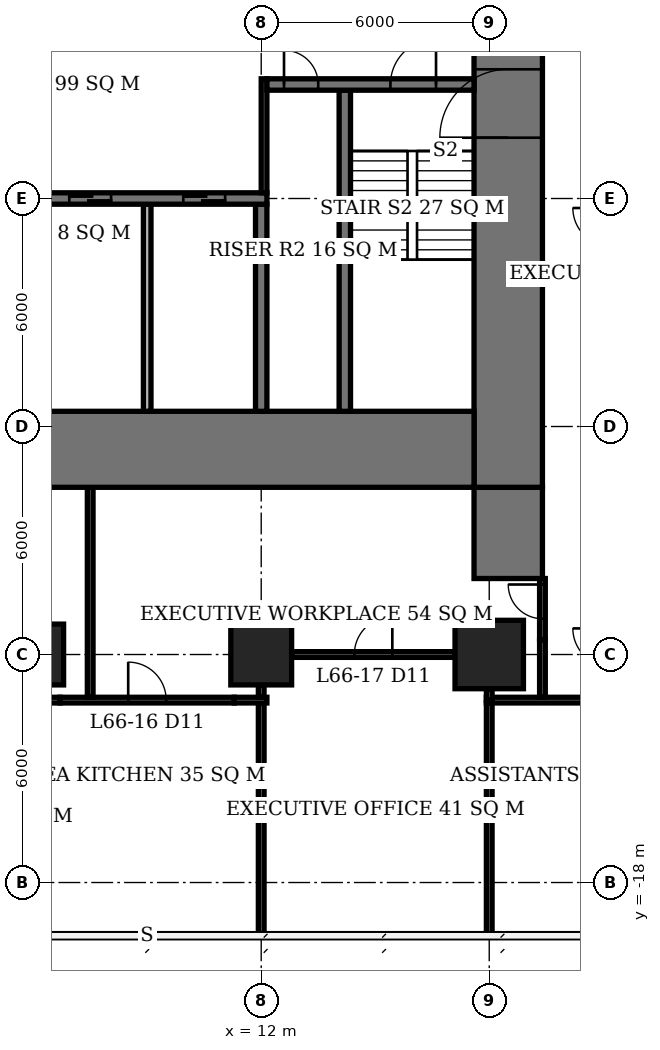
"""IFC4 building model, lengths in metres.
Left out: names, types, materials, properties, quantities, classifications, styles, units other than length and angle.
Written with IfcOpenShell. Run it as: python <this file> out.ifc"""

import sys

from ifc_helpers import new_model, si_unit, direction, frame, frame_2d, origin, origin_2d, place, context, subcontext, project, spatial, rectangle, extrude, element, fill, save


model = new_model("IFC4")
c1 = context("Model", 3, precision=1e-05, world=origin(), true_north=direction((0.0, 1.0)))
c2 = subcontext(c1, "Body", "Model", "MODEL_VIEW")
j1 = project(units=[si_unit("LENGTHUNIT", "METRE"), si_unit("PLANEANGLEUNIT", "RADIAN")], contexts=[c1])
p1 = place(None, origin())
s1 = spatial("IfcSite", under=j1, at=p1, CompositionType="ELEMENT")
p2 = place(p1, origin())
s2 = spatial("IfcBuilding", under=s1, at=p2, CompositionType="ELEMENT")
p3 = place(p2, frame((0.0, 0.0, 268.4)))
s3 = spatial("IfcBuildingStorey", under=s2, at=p3, CompositionType="ELEMENT", Elevation=268.4)
for number, where, z_axis, x_axis in (
    (1, (6.0, -12.0, 0.0), (0.0, 0.0, 1.0), (1.0, 0.0, 0.0)),
    (2, (12.0, -12.0, 0.0), (0.0, 0.0, 1.0), (1.0, 0.0, 0.0)),
):
    element("IfcColumn", number, at=place(p3, frame(where, z_axis=z_axis, x_axis=x_axis)), inside=s3, PredefinedType="COLUMN", context=c2, shape_type="SweptSolid", body=[
        extrude(rectangle(XDim=1.6, YDim=1.6, at=origin_2d()), origin(), (0.0, 0.0, 1.0), 3.9),
    ])
p4 = place(p3, frame((18.0, -12.0, 0.0), z_axis=(0.0, 0.0, 1.0), x_axis=(1.0, 0.0, 0.0)))
e3 = element("IfcColumn", 3, at=p4, inside=s3, PredefinedType="COLUMN", context=c2, shape_type="SweptSolid", body=[
    extrude(rectangle(XDim=1.8, YDim=1.8, at=origin_2d()), origin(), (0.0, 0.0, 1.0), 3.9),
])
p5 = place(p3, frame((-5.6, -6.6, 0.0), z_axis=(0.0, 0.0, 1.0), x_axis=(1.0, 0.0, 0.0)))
e4 = element("IfcWall", 4, at=p5, inside=s3, PredefinedType="SHEAR", context=c2, shape_type="SweptSolid", body=[
    extrude(rectangle(XDim=23.2, YDim=2.0, at=frame_2d((11.6, 0.0))), origin(), (0.0, 0.0, 1.0), 3.9),
])
p6 = place(p3, frame((18.5, -7.6, 0.0), z_axis=(0.0, 0.0, 1.0), x_axis=(0.0, 1.0, 0.0)))
e5 = element("IfcWall", 5, at=p6, inside=s3, PredefinedType="SHEAR", context=c2, shape_type="SweptSolid", body=[
    extrude(rectangle(XDim=21.2, YDim=1.8, at=frame_2d((10.6, 0.0))), origin(), (0.0, 0.0, 1.0), 3.9),
])
p7 = place(p6, frame((9.2, 0.0, 0.0)))
e6 = element("IfcOpeningElement", 6, at=p7, cuts=e5, PredefinedType="OPENING", context=c2, shape_type="SweptSolid", body=[
    extrude(rectangle(XDim=1.8, YDim=2.4, at=frame_2d((0.9, 1.2))), frame((0.0, 0.91, 0.0), z_axis=(0.0, -1.0, 0.0), x_axis=(1.0, 0.0, 0.0)), (0.0, 0.0, 1.0), 1.82),
])
p8 = place(p3, frame((18.5, -10.0, 0.0), z_axis=(0.0, 0.0, 1.0), x_axis=(0.0, 1.0, 0.0)))
e7 = element("IfcWall", 7, at=p8, inside=s3, PredefinedType="SHEAR", context=c2, shape_type="SweptSolid", body=[
    extrude(rectangle(XDim=2.4, YDim=1.8, at=frame_2d((1.2, 0.0))), origin(), (0.0, 0.0, 1.0), 3.9),
])
p9 = place(p3, frame((-5.6, 0.0, 0.0), z_axis=(0.0, 0.0, 1.0), x_axis=(1.0, 0.0, 0.0)))
e8 = element("IfcWall", 8, at=p9, inside=s3, PredefinedType="SHEAR", context=c2, shape_type="SweptSolid", body=[
    extrude(rectangle(XDim=17.75, YDim=0.3, at=frame_2d((8.875, 0.0))), origin(), (0.0, 0.0, 1.0), 3.9),
])
p10 = place(p9, frame((0.6, 0.0, 0.0)))
e9 = element("IfcOpeningElement", 9, at=p10, cuts=e8, PredefinedType="OPENING", context=c2, shape_type="SweptSolid", body=[
    extrude(rectangle(XDim=0.9, YDim=2.1, at=frame_2d((0.45, 1.05))), frame((0.0, 0.16, 0.0), z_axis=(0.0, -1.0, 0.0), x_axis=(1.0, 0.0, 0.0)), (0.0, 0.0, 1.0), 0.32),
])
p11 = place(p9, frame((3.7, 0.0, 0.0)))
e10 = element("IfcOpeningElement", 10, at=p11, cuts=e8, PredefinedType="OPENING", context=c2, shape_type="SweptSolid", body=[
    extrude(rectangle(XDim=1.0, YDim=2.1, at=frame_2d((0.5, 1.05))), frame((0.0, 0.16, 0.0), z_axis=(0.0, -1.0, 0.0), x_axis=(1.0, 0.0, 0.0)), (0.0, 0.0, 1.0), 0.32),
])
p12 = place(p9, frame((9.6, 0.0, 0.0)))
e11 = element("IfcOpeningElement", 11, at=p12, cuts=e8, PredefinedType="OPENING", context=c2, shape_type="SweptSolid", body=[
    extrude(rectangle(XDim=1.0, YDim=2.1, at=frame_2d((0.5, 1.05))), frame((0.0, 0.16, 0.0), z_axis=(0.0, -1.0, 0.0), x_axis=(1.0, 0.0, 0.0)), (0.0, 0.0, 1.0), 0.32),
])
p13 = place(p9, frame((12.55, 0.0, 0.0)))
e12 = element("IfcOpeningElement", 12, at=p13, cuts=e8, PredefinedType="OPENING", context=c2, shape_type="SweptSolid", body=[
    extrude(rectangle(XDim=1.1, YDim=2.1, at=frame_2d((0.55, 1.05))), frame((0.0, 0.16, 0.0), z_axis=(0.0, -1.0, 0.0), x_axis=(1.0, 0.0, 0.0)), (0.0, 0.0, 1.0), 0.32),
])
p14 = place(p9, frame((15.55, 0.0, 0.0)))
e13 = element("IfcOpeningElement", 13, at=p14, cuts=e8, PredefinedType="OPENING", context=c2, shape_type="SweptSolid", body=[
    extrude(rectangle(XDim=1.1, YDim=2.1, at=frame_2d((0.55, 1.05))), frame((0.0, 0.16, 0.0), z_axis=(0.0, -1.0, 0.0), x_axis=(1.0, 0.0, 0.0)), (0.0, 0.0, 1.0), 0.32),
])
p15 = place(p3, frame((12.15, 3.0, 0.0), z_axis=(0.0, 0.0, 1.0), x_axis=(1.0, 0.0, 0.0)))
e14 = element("IfcWall", 14, at=p15, inside=s3, PredefinedType="SHEAR", context=c2, shape_type="SweptSolid", body=[
    extrude(rectangle(XDim=5.45, YDim=0.3, at=frame_2d((2.725, 0.0))), origin(), (0.0, 0.0, 1.0), 3.9),
])
p16 = place(p15, frame((3.25, 0.0, 0.0)))
e15 = element("IfcOpeningElement", 15, at=p16, cuts=e14, PredefinedType="OPENING", context=c2, shape_type="SweptSolid", body=[
    extrude(rectangle(XDim=1.2, YDim=2.1, at=frame_2d((0.6, 1.05))), frame((0.0, 0.16, 0.0), z_axis=(0.0, -1.0, 0.0), x_axis=(1.0, 0.0, 0.0)), (0.0, 0.0, 1.0), 0.32),
])
p17 = place(p15, frame((0.45, 0.0, 0.0)))
e16 = element("IfcOpeningElement", 16, at=p17, cuts=e14, PredefinedType="OPENING", context=c2, shape_type="SweptSolid", body=[
    extrude(rectangle(XDim=0.9, YDim=2.1, at=frame_2d((0.45, 1.05))), frame((0.0, 0.16, 0.0), z_axis=(0.0, -1.0, 0.0), x_axis=(1.0, 0.0, 0.0)), (0.0, 0.0, 1.0), 0.32),
])
p18 = place(p3, frame((12.0, -5.6, 0.0), z_axis=(0.0, 0.0, 1.0), x_axis=(0.0, 1.0, 0.0)))
e17 = element("IfcWall", 17, at=p18, inside=s3, PredefinedType="SHEAR", context=c2, shape_type="SweptSolid", body=[
    extrude(rectangle(XDim=5.45, YDim=0.3, at=frame_2d((2.725, 0.0))), origin(), (0.0, 0.0, 1.0), 3.9),
])
p19 = place(p3, frame((14.2, -5.6, 0.0), z_axis=(0.0, 0.0, 1.0), x_axis=(0.0, 1.0, 0.0)))
e18 = element("IfcWall", 18, at=p19, inside=s3, PredefinedType="SHEAR", context=c2, shape_type="SweptSolid", body=[
    extrude(rectangle(XDim=8.45, YDim=0.3, at=frame_2d((4.225, 0.0))), origin(), (0.0, 0.0, 1.0), 3.9),
])
p20 = place(p3, frame((9.0, -5.6, 0.0), z_axis=(0.0, 0.0, 1.0), x_axis=(0.0, 1.0, 0.0)))
e19 = element("IfcWall", 19, at=p20, inside=s3, PredefinedType="SOLIDWALL", context=c2, shape_type="SweptSolid", body=[
    extrude(rectangle(XDim=5.45, YDim=0.2, at=frame_2d((2.725, 0.0))), origin(), (0.0, 0.0, 1.0), 3.9),
])
p21 = place(p3, frame((6.0, -13.2, 0.0), z_axis=(0.0, 0.0, 1.0), x_axis=(1.0, 0.0, 0.0)))
e20 = element("IfcWall", 20, at=p21, inside=s3, PredefinedType="PARTITIONING", context=c2, shape_type="SweptSolid", body=[
    extrude(rectangle(XDim=0.71, YDim=0.15, at=frame_2d((0.355, 0.0))), origin(), (0.0, 0.0, 1.0), 2.65),
])
p22 = place(p3, frame((6.71, -13.2, 0.0), z_axis=(0.0, 0.0, 1.0), x_axis=(1.0, 0.0, 0.0)))
e21 = element("IfcWall", 21, at=p22, inside=s3, PredefinedType="PARTITIONING", context=c2, shape_type="SweptSolid", body=[
    extrude(rectangle(XDim=4.58, YDim=0.15, at=frame_2d((2.29, 0.0))), origin(), (0.0, 0.0, 1.0), 3.65),
])
p23 = place(p22, frame((1.79, 0.0, 0.0)))
e22 = element("IfcOpeningElement", 22, at=p23, cuts=e21, PredefinedType="OPENING", context=c2, shape_type="SweptSolid", body=[
    extrude(rectangle(XDim=1.0, YDim=2.4, at=frame_2d((0.5, 1.2))), frame((0.0, 0.085, 0.0), z_axis=(0.0, -1.0, 0.0), x_axis=(1.0, 0.0, 0.0)), (0.0, 0.0, 1.0), 0.17),
])
p24 = place(p3, frame((11.29, -13.2, 0.0), z_axis=(0.0, 0.0, 1.0), x_axis=(1.0, 0.0, 0.0)))
e23 = element("IfcWall", 23, at=p24, inside=s3, PredefinedType="PARTITIONING", context=c2, shape_type="SweptSolid", body=[
    extrude(rectangle(XDim=0.86, YDim=0.15, at=frame_2d((0.43, 0.0))), origin(), (0.0, 0.0, 1.0), 2.65),
])
p25 = place(p3, frame((17.925, -13.2, 0.0), z_axis=(0.0, 0.0, 1.0), x_axis=(1.0, 0.0, 0.0)))
e24 = element("IfcWall", 24, at=p25, inside=s3, PredefinedType="PARTITIONING", context=c2, shape_type="SweptSolid", body=[
    extrude(rectangle(XDim=3.067, YDim=0.15, at=frame_2d((1.534, 0.0))), origin(), (0.0, 0.0, 1.0), 2.65),
])
p26 = place(p3, frame((12.8, -12.0, 0.0), z_axis=(0.0, 0.0, 1.0), x_axis=(1.0, 0.0, 0.0)))
e25 = element("IfcWall", 25, at=p26, inside=s3, PredefinedType="PARTITIONING", context=c2, shape_type="SweptSolid", body=[
    extrude(rectangle(XDim=4.3, YDim=0.15, at=frame_2d((2.15, 0.0))), origin(), (0.0, 0.0, 1.0), 3.65),
])
p27 = place(p26, frame((1.65, 0.0, 0.0)))
e26 = element("IfcOpeningElement", 26, at=p27, cuts=e25, PredefinedType="OPENING", context=c2, shape_type="SweptSolid", body=[
    extrude(rectangle(XDim=1.0, YDim=2.4, at=frame_2d((0.5, 1.2))), frame((0.0, 0.085, 0.0), z_axis=(0.0, -1.0, 0.0), x_axis=(1.0, 0.0, 0.0)), (0.0, 0.0, 1.0), 0.17),
])
p28 = place(p3, frame((12.0, -19.35, 0.0), z_axis=(0.0, 0.0, 1.0), x_axis=(0.0, 1.0, 0.0)))
e27 = element("IfcWall", 27, at=p28, inside=s3, PredefinedType="PARTITIONING", context=c2, shape_type="SweptSolid", body=[
    extrude(rectangle(XDim=3.04, YDim=0.15, at=frame_2d((1.52, 0.0))), origin(), (0.0, 0.0, 1.0), 3.65),
])
p29 = place(p3, frame((12.0, -16.31, 0.0), z_axis=(0.0, 0.0, 1.0), x_axis=(0.0, 1.0, 0.0)))
e28 = element("IfcWall", 28, at=p29, inside=s3, PredefinedType="PARTITIONING", context=c2, shape_type="SweptSolid", body=[
    extrude(rectangle(XDim=3.035, YDim=0.15, at=frame_2d((1.518, 0.0))), origin(), (0.0, 0.0, 1.0), 2.65),
])
p30 = place(p3, frame((12.0, -13.125, 0.0), z_axis=(0.0, 0.0, 1.0), x_axis=(0.0, 1.0, 0.0)))
e29 = element("IfcWall", 29, at=p30, inside=s3, PredefinedType="PARTITIONING", context=c2, shape_type="SweptSolid", body=[
    extrude(rectangle(XDim=0.325, YDim=0.15, at=frame_2d((0.163, 0.0))), origin(), (0.0, 0.0, 1.0), 2.65),
])
p31 = place(p3, frame((18.0, -19.375, 0.0), z_axis=(0.0, 0.0, 1.0), x_axis=(0.0, 1.0, 0.0)))
e30 = element("IfcWall", 30, at=p31, inside=s3, PredefinedType="PARTITIONING", context=c2, shape_type="SweptSolid", body=[
    extrude(rectangle(XDim=3.065, YDim=0.15, at=frame_2d((1.532, 0.0))), origin(), (0.0, 0.0, 1.0), 3.65),
])
p32 = place(p3, frame((18.0, -16.31, 0.0), z_axis=(0.0, 0.0, 1.0), x_axis=(0.0, 1.0, 0.0)))
e31 = element("IfcWall", 31, at=p32, inside=s3, PredefinedType="PARTITIONING", context=c2, shape_type="SweptSolid", body=[
    extrude(rectangle(XDim=3.035, YDim=0.15, at=frame_2d((1.518, 0.0))), origin(), (0.0, 0.0, 1.0), 2.65),
])
p33 = place(p3, frame((18.0, -13.2, 0.0), z_axis=(0.0, 0.0, 1.0), x_axis=(0.0, 1.0, 0.0)))
e32 = element("IfcWall", 32, at=p33, inside=s3, PredefinedType="PARTITIONING", context=c2, shape_type="SweptSolid", body=[
    extrude(rectangle(XDim=0.3, YDim=0.15, at=frame_2d((0.15, 0.0))), origin(), (0.0, 0.0, 1.0), 2.65),
])
p34 = place(p3, frame((7.5, -13.125, 0.0), z_axis=(0.0, 0.0, 1.0), x_axis=(0.0, 1.0, 0.0)))
e33 = element("IfcWall", 33, at=p34, inside=s3, PredefinedType="PARTITIONING", context=c2, shape_type="SweptSolid", body=[
    extrude(rectangle(XDim=5.525, YDim=0.15, at=frame_2d((2.762, 0.0))), origin(), (0.0, 0.0, 1.0), 3.65),
])
p35 = place(p3, frame((19.4, -13.125, 0.0), z_axis=(0.0, 0.0, 1.0), x_axis=(0.0, 1.0, 0.0)))
e34 = element("IfcWall", 34, at=p35, inside=s3, PredefinedType="PARTITIONING", context=c2, shape_type="SweptSolid", body=[
    extrude(rectangle(XDim=1.517, YDim=0.15, at=frame_2d((0.759, 0.0))), origin(), (0.0, 0.0, 1.0), 2.65),
])
p36 = place(p3, frame((19.4, -11.608, 0.0), z_axis=(0.0, 0.0, 1.0), x_axis=(0.0, 1.0, 0.0)))
e35 = element("IfcWall", 35, at=p36, inside=s3, PredefinedType="PARTITIONING", context=c2, shape_type="SweptSolid", body=[
    extrude(rectangle(XDim=1.608, YDim=0.15, at=frame_2d((0.804, 0.0))), origin(), (0.0, 0.0, 1.0), 3.65),
])
p37 = place(p36, frame((0.55, 0.0, 0.0)))
e36 = element("IfcOpeningElement", 36, at=p37, cuts=e35, PredefinedType="OPENING", context=c2, shape_type="SweptSolid", body=[
    extrude(rectangle(XDim=0.9, YDim=2.1, at=frame_2d((0.45, 1.05))), frame((0.0, 0.085, 0.0), z_axis=(0.0, -1.0, 0.0), x_axis=(1.0, 0.0, 0.0)), (0.0, 0.0, 1.0), 0.17),
])
p38 = place(p3, frame((12.075, 0.15, 0.0), z_axis=(0.0, 0.0, 1.0), x_axis=(0.0, 1.0, 0.0)))
e37 = element("IfcWall", 37, at=p38, inside=s3, PredefinedType="PARTITIONING", context=c2, shape_type="SweptSolid", body=[
    extrude(rectangle(XDim=3.0, YDim=0.15, at=frame_2d((1.5, 0.0))), origin(), (0.0, 0.0, 1.0), 3.65),
])
p39 = place(p7, origin())
e38 = element("IfcDoor", 38, at=p39, inside=s3, OperationType="DOUBLE_DOOR_SINGLE_SWING", PredefinedType="DOOR", context=c2, shape_type="SweptSolid", body=[
    extrude(rectangle(XDim=1.8, YDim=2.4, at=frame_2d((0.9, 1.2))), frame((0.0, 0.025, 0.0), z_axis=(0.0, -1.0, 0.0), x_axis=(1.0, 0.0, 0.0)), (0.0, 0.0, 1.0), 0.05),
])
fill(e6, e38)
p40 = place(p16, origin())
e39 = element("IfcDoor", 39, at=p40, inside=s3, OperationType="SINGLE_SWING_RIGHT", PredefinedType="DOOR", context=c2, shape_type="SweptSolid", body=[
    extrude(rectangle(XDim=1.2, YDim=2.1, at=frame_2d((0.6, 1.05))), frame((0.0, 0.025, 0.0), z_axis=(0.0, -1.0, 0.0), x_axis=(1.0, 0.0, 0.0)), (0.0, 0.0, 1.0), 0.05),
])
fill(e15, e39)
p41 = place(p17, origin())
e40 = element("IfcDoor", 40, at=p41, inside=s3, OperationType="SINGLE_SWING_LEFT", PredefinedType="DOOR", context=c2, shape_type="SweptSolid", body=[
    extrude(rectangle(XDim=0.9, YDim=2.1, at=frame_2d((0.45, 1.05))), frame((0.0, 0.025, 0.0), z_axis=(0.0, -1.0, 0.0), x_axis=(1.0, 0.0, 0.0)), (0.0, 0.0, 1.0), 0.05),
])
fill(e16, e40)
p42 = place(p13, origin())
e41 = element("IfcDoor", 41, at=p42, inside=s3, OperationType="DOUBLE_DOOR_SLIDING", PredefinedType="USERDEFINED", context=c2, shape_type="SweptSolid", body=[
    extrude(rectangle(XDim=1.1, YDim=2.1, at=frame_2d((0.55, 1.05))), frame((0.0, 0.025, 0.0), z_axis=(0.0, -1.0, 0.0), x_axis=(1.0, 0.0, 0.0)), (0.0, 0.0, 1.0), 0.05),
])
fill(e12, e41)
p43 = place(p14, origin())
e42 = element("IfcDoor", 42, at=p43, inside=s3, OperationType="DOUBLE_DOOR_SLIDING", PredefinedType="USERDEFINED", context=c2, shape_type="SweptSolid", body=[
    extrude(rectangle(XDim=1.1, YDim=2.1, at=frame_2d((0.55, 1.05))), frame((0.0, 0.025, 0.0), z_axis=(0.0, -1.0, 0.0), x_axis=(1.0, 0.0, 0.0)), (0.0, 0.0, 1.0), 0.05),
])
fill(e13, e42)
p44 = place(p23, origin())
e43 = element("IfcDoor", 43, at=p44, inside=s3, OperationType="SINGLE_SWING_LEFT", PredefinedType="DOOR", context=c2, shape_type="SweptSolid", body=[
    extrude(rectangle(XDim=1.0, YDim=2.4, at=frame_2d((0.5, 1.2))), frame((0.0, 0.025, 0.0), z_axis=(0.0, -1.0, 0.0), x_axis=(1.0, 0.0, 0.0)), (0.0, 0.0, 1.0), 0.05),
])
fill(e22, e43)
p45 = place(p27, origin())
e44 = element("IfcDoor", 44, at=p45, inside=s3, OperationType="SINGLE_SWING_RIGHT", PredefinedType="DOOR", context=c2, shape_type="SweptSolid", body=[
    extrude(rectangle(XDim=1.0, YDim=2.4, at=frame_2d((0.5, 1.2))), frame((0.0, 0.025, 0.0), z_axis=(0.0, -1.0, 0.0), x_axis=(1.0, 0.0, 0.0)), (0.0, 0.0, 1.0), 0.05),
])
fill(e26, e44)
p46 = place(p37, origin())
e45 = element("IfcDoor", 45, at=p46, inside=s3, OperationType="SINGLE_SWING_RIGHT", PredefinedType="DOOR", context=c2, shape_type="SweptSolid", body=[
    extrude(rectangle(XDim=0.9, YDim=2.1, at=frame_2d((0.45, 1.05))), frame((0.0, 0.025, 0.0), z_axis=(0.0, -1.0, 0.0), x_axis=(1.0, 0.0, 0.0)), (0.0, 0.0, 1.0), 0.05),
])
fill(e36, e45)
save(model, sys.argv[1])
